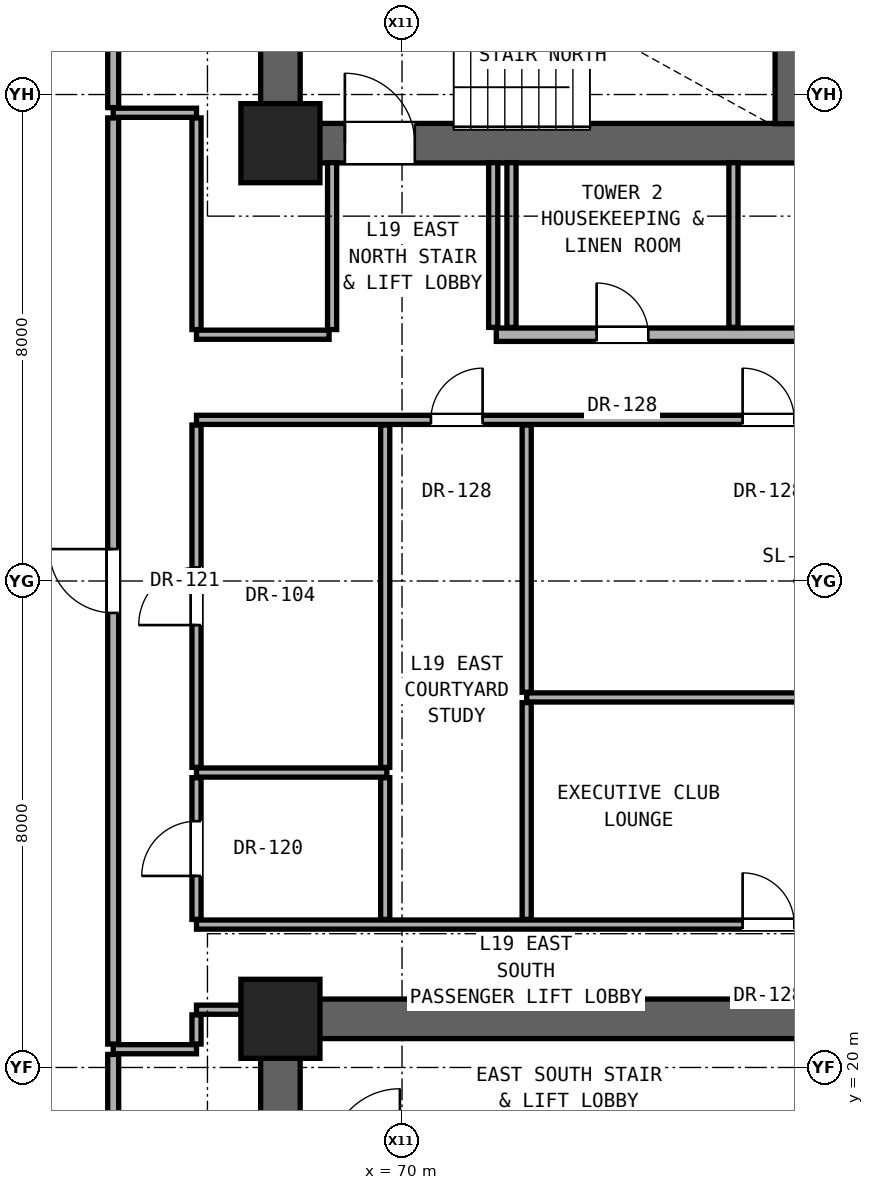
"""IFC4 building model, lengths in metres.
Left out: names, types, materials, properties, quantities, classifications, styles, units other than length and angle.
Written with IfcOpenShell. Run it as: python <this file> out.ifc"""

import sys

from ifc_helpers import new_model, si_unit, direction, frame, frame_2d, origin, origin_2d, place, context, subcontext, project, spatial, rectangle, extrude, element, fill, save


model = new_model("IFC4")
c1 = context("Model", 3, precision=1e-05, world=origin(), true_north=direction((0.0, 1.0)))
c2 = subcontext(c1, "Body", "Model", "MODEL_VIEW")
j1 = project(units=[si_unit("LENGTHUNIT", "METRE"), si_unit("PLANEANGLEUNIT", "RADIAN")], contexts=[c1])
p1 = place(None, origin())
s1 = spatial("IfcSite", under=j1, at=p1, CompositionType="ELEMENT")
p2 = place(p1, origin())
s2 = spatial("IfcBuilding", under=s1, at=p2, CompositionType="ELEMENT")
p3 = place(p2, frame((0.0, 0.0, 68.6)))
s3 = spatial("IfcBuildingStorey", under=s2, at=p3, CompositionType="ELEMENT", Elevation=68.6)
for number, where, z_axis, x_axis in (
    (1, (68.0, 20.8, 0.0), (0.0, 0.0, 1.0), (1.0, 0.0, 0.0)),
    (2, (68.0, 35.2, 0.0), (0.0, 0.0, 1.0), (1.0, 0.0, 0.0)),
):
    element("IfcColumn", number, at=place(p3, frame(where, z_axis=z_axis, x_axis=x_axis)), inside=s3, PredefinedType="COLUMN", context=c2, shape_type="SweptSolid", body=[
        extrude(rectangle(XDim=1.3, YDim=1.3, at=origin_2d()), origin(), (0.0, 0.0, 1.0), 3.3),
    ])
p4 = place(p3, frame((68.0, 35.2, 0.0), z_axis=(0.0, 0.0, 1.0), x_axis=(0.0, 1.0, 0.0)))
e3 = element("IfcWall", 3, at=p4, inside=s3, PredefinedType="SHEAR", context=c2, shape_type="SweptSolid", body=[
    extrude(rectangle(XDim=5.6, YDim=0.65, at=frame_2d((2.8, 0.0))), origin(), (0.0, 0.0, 1.0), 3.06),
])
p5 = place(p3, frame((68.0, 35.2, 0.0), z_axis=(0.0, 0.0, 1.0), x_axis=(1.0, 0.0, 0.0)))
e4 = element("IfcWall", 4, at=p5, inside=s3, PredefinedType="SHEAR", context=c2, shape_type="SweptSolid", body=[
    extrude(rectangle(XDim=17.0, YDim=0.65, at=frame_2d((8.5, 0.0))), origin(), (0.0, 0.0, 1.0), 3.06),
])
p6 = place(p5, frame((1.06, 0.0, 0.0)))
e5 = element("IfcOpeningElement", 5, at=p6, cuts=e4, PredefinedType="OPENING", context=c2, shape_type="SweptSolid", body=[
    extrude(rectangle(XDim=1.15, YDim=2.2, at=frame_2d((0.575, 1.1))), frame((0.0, 0.335, 0.0), z_axis=(0.0, -1.0, 0.0), x_axis=(1.0, 0.0, 0.0)), (0.0, 0.0, 1.0), 0.67),
])
p7 = place(p5, frame((8.75, 0.0, 0.0)))
e6 = element("IfcOpeningElement", 6, at=p7, cuts=e4, PredefinedType="OPENING", context=c2, shape_type="SweptSolid", body=[
    extrude(rectangle(XDim=1.4, YDim=2.35, at=frame_2d((0.7, 1.175))), frame((0.0, 0.335, 0.0), z_axis=(0.0, -1.0, 0.0), x_axis=(1.0, 0.0, 0.0)), (0.0, 0.0, 1.0), 0.67),
])
p8 = place(p5, frame((10.77, 0.0, 0.0)))
e7 = element("IfcOpeningElement", 7, at=p8, cuts=e4, PredefinedType="OPENING", context=c2, shape_type="SweptSolid", body=[
    extrude(rectangle(XDim=1.3, YDim=2.3, at=frame_2d((0.65, 1.15))), frame((0.0, 0.335, 0.0), z_axis=(0.0, -1.0, 0.0), x_axis=(1.0, 0.0, 0.0)), (0.0, 0.0, 1.0), 0.67),
])
p9 = place(p5, frame((12.69, 0.0, 0.0)))
e8 = element("IfcOpeningElement", 8, at=p9, cuts=e4, PredefinedType="OPENING", context=c2, shape_type="SweptSolid", body=[
    extrude(rectangle(XDim=1.3, YDim=2.3, at=frame_2d((0.65, 1.15))), frame((0.0, 0.335, 0.0), z_axis=(0.0, -1.0, 0.0), x_axis=(1.0, 0.0, 0.0)), (0.0, 0.0, 1.0), 0.67),
])
p10 = place(p5, frame((14.57, 0.0, 0.0)))
e9 = element("IfcOpeningElement", 9, at=p10, cuts=e4, PredefinedType="OPENING", context=c2, shape_type="SweptSolid", body=[
    extrude(rectangle(XDim=1.3, YDim=2.3, at=frame_2d((0.65, 1.15))), frame((0.0, 0.335, 0.0), z_axis=(0.0, -1.0, 0.0), x_axis=(1.0, 0.0, 0.0)), (0.0, 0.0, 1.0), 0.67),
])
p11 = place(p3, frame((68.0, 15.2, 0.0), z_axis=(0.0, 0.0, 1.0), x_axis=(0.0, 1.0, 0.0)))
e10 = element("IfcWall", 10, at=p11, inside=s3, PredefinedType="SHEAR", context=c2, shape_type="SweptSolid", body=[
    extrude(rectangle(XDim=5.6, YDim=0.65, at=frame_2d((2.8, 0.0))), origin(), (0.0, 0.0, 1.0), 3.06),
])
p12 = place(p3, frame((68.0, 20.8, 0.0), z_axis=(0.0, 0.0, 1.0), x_axis=(1.0, 0.0, 0.0)))
e11 = element("IfcWall", 11, at=p12, inside=s3, PredefinedType="SHEAR", context=c2, shape_type="SweptSolid", body=[
    extrude(rectangle(XDim=17.0, YDim=0.65, at=frame_2d((8.5, 0.0))), origin(), (0.0, 0.0, 1.0), 3.06),
])
p13 = place(p12, frame((9.55, 0.0, 0.0)))
e12 = element("IfcOpeningElement", 12, at=p13, cuts=e11, PredefinedType="OPENING", context=c2, shape_type="SweptSolid", body=[
    extrude(rectangle(XDim=1.3, YDim=2.3, at=frame_2d((0.65, 1.15))), frame((0.0, 0.335, 0.0), z_axis=(0.0, -1.0, 0.0), x_axis=(1.0, 0.0, 0.0)), (0.0, 0.0, 1.0), 0.67),
])
p14 = place(p12, frame((12.05, 0.0, 0.0)))
e13 = element("IfcOpeningElement", 13, at=p14, cuts=e11, PredefinedType="OPENING", context=c2, shape_type="SweptSolid", body=[
    extrude(rectangle(XDim=1.3, YDim=2.3, at=frame_2d((0.65, 1.15))), frame((0.0, 0.335, 0.0), z_axis=(0.0, -1.0, 0.0), x_axis=(1.0, 0.0, 0.0)), (0.0, 0.0, 1.0), 0.67),
])
p15 = place(p3, frame((65.25, 20.3, 0.0), z_axis=(0.0, 0.0, 1.0), x_axis=(1.0, 0.0, 0.0)))
e14 = element("IfcWall", 14, at=p15, inside=s3, PredefinedType="PARTITIONING", context=c2, shape_type="SweptSolid", body=[
    extrude(rectangle(XDim=1.37, YDim=0.15, at=frame_2d((0.685, 0.0))), origin(), (0.0, 0.0, 1.0), 3.06),
])
p16 = place(p3, frame((66.62, 20.95, 0.0), z_axis=(0.0, 0.0, 1.0), x_axis=(1.0, 0.0, 0.0)))
e15 = element("IfcWall", 15, at=p16, inside=s3, PredefinedType="PARTITIONING", context=c2, shape_type="SweptSolid", body=[
    extrude(rectangle(XDim=1.06, YDim=0.15, at=frame_2d((0.53, 0.0))), origin(), (0.0, 0.0, 1.0), 2.452),
])
p17 = place(p3, frame((66.62, 22.35, 0.0), z_axis=(0.0, 0.0, 1.0), x_axis=(1.0, 0.0, 0.0)))
e16 = element("IfcWall", 16, at=p17, inside=s3, PredefinedType="PARTITIONING", context=c2, shape_type="SweptSolid", body=[
    extrude(rectangle(XDim=19.63, YDim=0.15, at=frame_2d((9.815, 0.0))), origin(), (0.0, 0.0, 1.0), 2.125),
])
p18 = place(p17, frame((8.981, 0.0, 0.0)))
e17 = element("IfcOpeningElement", 17, at=p18, cuts=e16, PredefinedType="OPENING", context=c2, shape_type="SweptSolid", body=[
    extrude(rectangle(XDim=0.85, YDim=2.01, at=frame_2d((0.425, 1.005))), frame((0.0, 0.085, 0.0), z_axis=(0.0, -1.0, 0.0), x_axis=(1.0, 0.0, 0.0)), (0.0, 0.0, 1.0), 0.17),
])
p19 = place(p17, frame((16.061, 0.0, 0.0)))
e18 = element("IfcOpeningElement", 18, at=p19, cuts=e16, PredefinedType="OPENING", context=c2, shape_type="SweptSolid", body=[
    extrude(rectangle(XDim=0.85, YDim=2.01, at=frame_2d((0.425, 1.005))), frame((0.0, 0.085, 0.0), z_axis=(0.0, -1.0, 0.0), x_axis=(1.0, 0.0, 0.0)), (0.0, 0.0, 1.0), 0.17),
])
p20 = place(p3, frame((66.62, 24.85, 0.0), z_axis=(0.0, 0.0, 1.0), x_axis=(1.0, 0.0, 0.0)))
e19 = element("IfcWall", 19, at=p20, inside=s3, PredefinedType="PARTITIONING", context=c2, shape_type="SweptSolid", body=[
    extrude(rectangle(XDim=3.13, YDim=0.15, at=frame_2d((1.565, 0.0))), origin(), (0.0, 0.0, 1.0), 2.125),
])
p21 = place(p3, frame((72.05, 26.085, 0.0), z_axis=(0.0, 0.0, 1.0), x_axis=(1.0, 0.0, 0.0)))
e20 = element("IfcWall", 20, at=p21, inside=s3, PredefinedType="PARTITIONING", context=c2, shape_type="SweptSolid", body=[
    extrude(rectangle(XDim=14.2, YDim=0.15, at=frame_2d((7.1, 0.0))), origin(), (0.0, 0.0, 1.0), 2.125),
])
p22 = place(p3, frame((66.62, 30.65, 0.0), z_axis=(0.0, 0.0, 1.0), x_axis=(1.0, 0.0, 0.0)))
e21 = element("IfcWall", 21, at=p22, inside=s3, PredefinedType="PARTITIONING", context=c2, shape_type="SweptSolid", body=[
    extrude(rectangle(XDim=19.63, YDim=0.15, at=frame_2d((9.815, 0.0))), origin(), (0.0, 0.0, 1.0), 2.125),
])
p23 = place(p22, frame((3.855, 0.0, 0.0)))
e22 = element("IfcOpeningElement", 22, at=p23, cuts=e21, PredefinedType="OPENING", context=c2, shape_type="SweptSolid", body=[
    extrude(rectangle(XDim=0.85, YDim=2.01, at=frame_2d((0.425, 1.005))), frame((0.0, 0.085, 0.0), z_axis=(0.0, -1.0, 0.0), x_axis=(1.0, 0.0, 0.0)), (0.0, 0.0, 1.0), 0.17),
])
p24 = place(p22, frame((8.981, 0.0, 0.0)))
e23 = element("IfcOpeningElement", 23, at=p24, cuts=e21, PredefinedType="OPENING", context=c2, shape_type="SweptSolid", body=[
    extrude(rectangle(XDim=0.85, YDim=2.01, at=frame_2d((0.425, 1.005))), frame((0.0, 0.085, 0.0), z_axis=(0.0, -1.0, 0.0), x_axis=(1.0, 0.0, 0.0)), (0.0, 0.0, 1.0), 0.17),
])
p25 = place(p22, frame((16.061, 0.0, 0.0)))
e24 = element("IfcOpeningElement", 24, at=p25, cuts=e21, PredefinedType="OPENING", context=c2, shape_type="SweptSolid", body=[
    extrude(rectangle(XDim=0.85, YDim=2.01, at=frame_2d((0.425, 1.005))), frame((0.0, 0.085, 0.0), z_axis=(0.0, -1.0, 0.0), x_axis=(1.0, 0.0, 0.0)), (0.0, 0.0, 1.0), 0.17),
])
p26 = place(p3, frame((66.62, 32.05, 0.0), z_axis=(0.0, 0.0, 1.0), x_axis=(1.0, 0.0, 0.0)))
e25 = element("IfcWall", 25, at=p26, inside=s3, PredefinedType="PARTITIONING", context=c2, shape_type="SweptSolid", body=[
    extrude(rectangle(XDim=2.18, YDim=0.15, at=frame_2d((1.09, 0.0))), origin(), (0.0, 0.0, 1.0), 2.125),
])
p27 = place(p3, frame((71.55, 32.05, 0.0), z_axis=(0.0, 0.0, 1.0), x_axis=(1.0, 0.0, 0.0)))
e26 = element("IfcWall", 26, at=p27, inside=s3, PredefinedType="SOLIDWALL", context=c2, shape_type="SweptSolid", body=[
    extrude(rectangle(XDim=14.7, YDim=0.22, at=frame_2d((7.35, 0.0))), origin(), (0.0, 0.0, 1.0), 2.125),
])
p28 = place(p27, frame((11.39, 0.0, 0.0)))
e27 = element("IfcOpeningElement", 27, at=p28, cuts=e26, PredefinedType="OPENING", context=c2, shape_type="SweptSolid", body=[
    extrude(rectangle(XDim=0.85, YDim=2.01, at=frame_2d((0.425, 1.005))), frame((0.0, 0.12, 0.0), z_axis=(0.0, -1.0, 0.0), x_axis=(1.0, 0.0, 0.0)), (0.0, 0.0, 1.0), 0.24),
])
p29 = place(p27, frame((6.065, 0.0, 0.0)))
e28 = element("IfcOpeningElement", 28, at=p29, cuts=e26, PredefinedType="OPENING", context=c2, shape_type="SweptSolid", body=[
    extrude(rectangle(XDim=0.85, YDim=2.01, at=frame_2d((0.425, 1.005))), frame((0.0, 0.12, 0.0), z_axis=(0.0, -1.0, 0.0), x_axis=(1.0, 0.0, 0.0)), (0.0, 0.0, 1.0), 0.24),
])
p30 = place(p27, frame((1.65, 0.0, 0.0)))
e29 = element("IfcOpeningElement", 29, at=p30, cuts=e26, PredefinedType="OPENING", context=c2, shape_type="SweptSolid", body=[
    extrude(rectangle(XDim=0.85, YDim=2.01, at=frame_2d((0.425, 1.005))), frame((0.0, 0.12, 0.0), z_axis=(0.0, -1.0, 0.0), x_axis=(1.0, 0.0, 0.0)), (0.0, 0.0, 1.0), 0.24),
])
p31 = place(p3, frame((65.25, 35.7, 0.0), z_axis=(0.0, 0.0, 1.0), x_axis=(1.0, 0.0, 0.0)))
e30 = element("IfcWall", 30, at=p31, inside=s3, PredefinedType="PARTITIONING", context=c2, shape_type="SweptSolid", body=[
    extrude(rectangle(XDim=1.37, YDim=0.15, at=frame_2d((0.685, 0.0))), origin(), (0.0, 0.0, 1.0), 3.06),
])
p32 = place(p3, frame((65.25, 16.454, 0.0), z_axis=(0.0, 0.0, 1.0), x_axis=(0.0, 1.0, 0.0)))
e31 = element("IfcWall", 31, at=p32, inside=s3, PredefinedType="PARTITIONING", context=c2, shape_type="SweptSolid", body=[
    extrude(rectangle(XDim=3.761, YDim=0.18, at=frame_2d((1.88, 0.0))), origin(), (0.0, 0.0, 1.0), 2.436),
])
p33 = place(p3, frame((65.25, 20.385, 0.0), z_axis=(0.0, 0.0, 1.0), x_axis=(0.0, 1.0, 0.0)))
e32 = element("IfcWall", 32, at=p33, inside=s3, PredefinedType="PARTITIONING", context=c2, shape_type="SweptSolid", body=[
    extrude(rectangle(XDim=15.23, YDim=0.18, at=frame_2d((7.615, 0.0))), origin(), (0.0, 0.0, 1.0), 2.279),
])
p34 = place(p33, frame((7.09, 0.0, 0.0)))
e33 = element("IfcOpeningElement", 33, at=p34, cuts=e32, PredefinedType="OPENING", context=c2, shape_type="SweptSolid", body=[
    extrude(rectangle(XDim=1.05, YDim=2.2, at=frame_2d((0.525, 1.1))), frame((0.0, 0.1, 0.0), z_axis=(0.0, -1.0, 0.0), x_axis=(1.0, 0.0, 0.0)), (0.0, 0.0, 1.0), 0.2),
])
p35 = place(p3, frame((65.25, 35.785, 0.0), z_axis=(0.0, 0.0, 1.0), x_axis=(0.0, 1.0, 0.0)))
e34 = element("IfcWall", 34, at=p35, inside=s3, PredefinedType="PARTITIONING", context=c2, shape_type="SweptSolid", body=[
    extrude(rectangle(XDim=1.042, YDim=0.18, at=frame_2d((0.521, 0.0))), origin(), (0.0, 0.0, 1.0), 3.06),
])
p36 = place(p3, frame((66.62, 20.385, 0.0), z_axis=(0.0, 0.0, 1.0), x_axis=(0.0, 1.0, 0.0)))
e35 = element("IfcWall", 35, at=p36, inside=s3, PredefinedType="PARTITIONING", context=c2, shape_type="SweptSolid", body=[
    extrude(rectangle(XDim=0.48, YDim=0.15, at=frame_2d((0.24, 0.0))), origin(), (0.0, 0.0, 1.0), 2.452),
])
p37 = place(p3, frame((66.62, 22.435, 0.0), z_axis=(0.0, 0.0, 1.0), x_axis=(0.0, 1.0, 0.0)))
e36 = element("IfcWall", 36, at=p37, inside=s3, PredefinedType="PARTITIONING", context=c2, shape_type="SweptSolid", body=[
    extrude(rectangle(XDim=2.33, YDim=0.15, at=frame_2d((1.165, 0.0))), origin(), (0.0, 0.0, 1.0), 3.06),
])
p38 = place(p37, frame((0.715, 0.0, 0.0)))
e37 = element("IfcOpeningElement", 37, at=p38, cuts=e36, PredefinedType="OPENING", context=c2, shape_type="SweptSolid", body=[
    extrude(rectangle(XDim=0.9, YDim=2.1, at=frame_2d((0.45, 1.05))), frame((0.0, 0.085, 0.0), z_axis=(0.0, -1.0, 0.0), x_axis=(1.0, 0.0, 0.0)), (0.0, 0.0, 1.0), 0.17),
])
p39 = place(p3, frame((66.62, 24.935, 0.0), z_axis=(0.0, 0.0, 1.0), x_axis=(0.0, 1.0, 0.0)))
e38 = element("IfcWall", 38, at=p39, inside=s3, PredefinedType="PARTITIONING", context=c2, shape_type="SweptSolid", body=[
    extrude(rectangle(XDim=5.63, YDim=0.15, at=frame_2d((2.815, 0.0))), origin(), (0.0, 0.0, 1.0), 2.279),
])
p40 = place(p39, frame((2.34, 0.0, 0.0)))
e39 = element("IfcOpeningElement", 39, at=p40, cuts=e38, PredefinedType="OPENING", context=c2, shape_type="SweptSolid", body=[
    extrude(rectangle(XDim=0.95, YDim=2.15, at=frame_2d((0.475, 1.075))), frame((0.0, 0.085, 0.0), z_axis=(0.0, -1.0, 0.0), x_axis=(1.0, 0.0, 0.0)), (0.0, 0.0, 1.0), 0.17),
])
p41 = place(p3, frame((66.62, 32.135, 0.0), z_axis=(0.0, 0.0, 1.0), x_axis=(0.0, 1.0, 0.0)))
e40 = element("IfcWall", 40, at=p41, inside=s3, PredefinedType="PARTITIONING", context=c2, shape_type="SweptSolid", body=[
    extrude(rectangle(XDim=3.48, YDim=0.15, at=frame_2d((1.74, 0.0))), origin(), (0.0, 0.0, 1.0), 2.452),
])
p42 = place(p3, frame((68.85, 32.135, 0.0), z_axis=(0.0, 0.0, 1.0), x_axis=(0.0, 1.0, 0.0)))
e41 = element("IfcWall", 41, at=p42, inside=s3, PredefinedType="PARTITIONING", context=c2, shape_type="SweptSolid", body=[
    extrude(rectangle(XDim=2.745, YDim=0.15, at=frame_2d((1.373, 0.0))), origin(), (0.0, 0.0, 1.0), 3.06),
])
p43 = place(p3, frame((69.723, 22.435, 0.0), z_axis=(0.0, 0.0, 1.0), x_axis=(0.0, 1.0, 0.0)))
e42 = element("IfcWall", 42, at=p43, inside=s3, PredefinedType="PARTITIONING", context=c2, shape_type="SweptSolid", body=[
    extrude(rectangle(XDim=2.33, YDim=0.15, at=frame_2d((1.165, 0.0))), origin(), (0.0, 0.0, 1.0), 3.06),
])
p44 = place(p3, frame((69.723, 24.935, 0.0), z_axis=(0.0, 0.0, 1.0), x_axis=(0.0, 1.0, 0.0)))
e43 = element("IfcWall", 43, at=p44, inside=s3, PredefinedType="PARTITIONING", context=c2, shape_type="SweptSolid", body=[
    extrude(rectangle(XDim=5.63, YDim=0.15, at=frame_2d((2.815, 0.0))), origin(), (0.0, 0.0, 1.0), 2.125),
])
for number, where, z_axis, x_axis in (
    (44, (71.5, 32.17, 0.0), (0.0, 0.0, 1.0), (0.0, 1.0, 0.0)),
    (45, (71.8, 32.17, 0.0), (0.0, 0.0, 1.0), (0.0, 1.0, 0.0)),
):
    element("IfcWall", number, at=place(p3, frame(where, z_axis=z_axis, x_axis=x_axis)), inside=s3, PredefinedType="PARTITIONING", context=c2, shape_type="SweptSolid", body=[
        extrude(rectangle(XDim=2.71, YDim=0.15, at=frame_2d((1.355, 0.0))), origin(), (0.0, 0.0, 1.0), 3.06),
    ])
p45 = place(p3, frame((72.05, 22.435, 0.0), z_axis=(0.0, 0.0, 1.0), x_axis=(0.0, 1.0, 0.0)))
e46 = element("IfcWall", 46, at=p45, inside=s3, PredefinedType="PARTITIONING", context=c2, shape_type="SweptSolid", body=[
    extrude(rectangle(XDim=3.565, YDim=0.15, at=frame_2d((1.782, 0.0))), origin(), (0.0, 0.0, 1.0), 2.589),
])
p46 = place(p3, frame((72.05, 26.17, 0.0), z_axis=(0.0, 0.0, 1.0), x_axis=(0.0, 1.0, 0.0)))
e47 = element("IfcWall", 47, at=p46, inside=s3, PredefinedType="PARTITIONING", context=c2, shape_type="SweptSolid", body=[
    extrude(rectangle(XDim=4.395, YDim=0.15, at=frame_2d((2.198, 0.0))), origin(), (0.0, 0.0, 1.0), 2.125),
])
p47 = place(p3, frame((75.45, 32.17, 0.0), z_axis=(0.0, 0.0, 1.0), x_axis=(0.0, 1.0, 0.0)))
e48 = element("IfcWall", 48, at=p47, inside=s3, PredefinedType="PARTITIONING", context=c2, shape_type="SweptSolid", body=[
    extrude(rectangle(XDim=2.71, YDim=0.15, at=frame_2d((1.355, 0.0))), origin(), (0.0, 0.0, 1.0), 3.06),
])
p48 = place(p3, frame((76.36, 35.52, 0.0), z_axis=(0.0, 0.0, 1.0), x_axis=(0.0, 1.0, 0.0)))
e49 = element("IfcWall", 49, at=p48, inside=s3, PredefinedType="SHEAR", context=c2, shape_type="SweptSolid", body=[
    extrude(rectangle(XDim=2.745, YDim=0.45, at=frame_2d((1.373, 0.0))), origin(), (0.0, 0.0, 1.0), 3.06),
])
p49 = place(p6, origin())
e50 = element("IfcDoor", 50, at=p49, inside=s3, OperationType="SINGLE_SWING_LEFT", PredefinedType="DOOR", context=c2, shape_type="SweptSolid", body=[
    extrude(rectangle(XDim=1.15, YDim=2.2, at=frame_2d((0.575, 1.1))), frame((0.0, 0.025, 0.0), z_axis=(0.0, -1.0, 0.0), x_axis=(1.0, 0.0, 0.0)), (0.0, 0.0, 1.0), 0.05),
])
fill(e5, e50)
p50 = place(p30, origin())
e51 = element("IfcDoor", 51, at=p50, inside=s3, OperationType="SINGLE_SWING_LEFT", PredefinedType="DOOR", context=c2, shape_type="SweptSolid", body=[
    extrude(rectangle(XDim=0.85, YDim=2.01, at=frame_2d((0.425, 1.005))), frame((0.0, 0.025, 0.0), z_axis=(0.0, -1.0, 0.0), x_axis=(1.0, 0.0, 0.0)), (0.0, 0.0, 1.0), 0.05),
])
fill(e29, e51)
p51 = place(p38, origin())
e52 = element("IfcDoor", 52, at=p51, inside=s3, OperationType="SINGLE_SWING_LEFT", PredefinedType="DOOR", context=c2, shape_type="SweptSolid", body=[
    extrude(rectangle(XDim=0.9, YDim=2.1, at=frame_2d((0.45, 1.05))), frame((0.0, 0.025, 0.0), z_axis=(0.0, -1.0, 0.0), x_axis=(1.0, 0.0, 0.0)), (0.0, 0.0, 1.0), 0.05),
])
fill(e37, e52)
p52 = place(p34, origin())
e53 = element("IfcDoor", 53, at=p52, inside=s3, OperationType="SINGLE_SWING_RIGHT", PredefinedType="DOOR", context=c2, shape_type="SweptSolid", body=[
    extrude(rectangle(XDim=1.05, YDim=2.2, at=frame_2d((0.525, 1.1))), frame((0.0, 0.025, 0.0), z_axis=(0.0, -1.0, 0.0), x_axis=(1.0, 0.0, 0.0)), (0.0, 0.0, 1.0), 0.05),
])
fill(e33, e53)
p53 = place(p40, origin())
e54 = element("IfcDoor", 54, at=p53, inside=s3, OperationType="SINGLE_SWING_LEFT", PredefinedType="DOOR", context=c2, shape_type="SweptSolid", body=[
    extrude(rectangle(XDim=0.95, YDim=2.15, at=frame_2d((0.475, 1.075))), frame((0.0, 0.025, 0.0), z_axis=(0.0, -1.0, 0.0), x_axis=(1.0, 0.0, 0.0)), (0.0, 0.0, 1.0), 0.05),
])
fill(e39, e54)
p54 = place(p23, origin())
e55 = element("IfcDoor", 55, at=p54, inside=s3, OperationType="SINGLE_SWING_RIGHT", PredefinedType="DOOR", context=c2, shape_type="SweptSolid", body=[
    extrude(rectangle(XDim=0.85, YDim=2.01, at=frame_2d((0.425, 1.005))), frame((0.0, 0.025, 0.0), z_axis=(0.0, -1.0, 0.0), x_axis=(1.0, 0.0, 0.0)), (0.0, 0.0, 1.0), 0.05),
])
fill(e22, e55)
p55 = place(p18, origin())
e56 = element("IfcDoor", 56, at=p55, inside=s3, OperationType="SINGLE_SWING_LEFT", PredefinedType="DOOR", context=c2, shape_type="SweptSolid", body=[
    extrude(rectangle(XDim=0.85, YDim=2.01, at=frame_2d((0.425, 1.005))), frame((0.0, 0.025, 0.0), z_axis=(0.0, -1.0, 0.0), x_axis=(1.0, 0.0, 0.0)), (0.0, 0.0, 1.0), 0.05),
])
fill(e17, e56)
p56 = place(p24, origin())
e57 = element("IfcDoor", 57, at=p56, inside=s3, OperationType="SINGLE_SWING_LEFT", PredefinedType="DOOR", context=c2, shape_type="SweptSolid", body=[
    extrude(rectangle(XDim=0.85, YDim=2.01, at=frame_2d((0.425, 1.005))), frame((0.0, 0.025, 0.0), z_axis=(0.0, -1.0, 0.0), x_axis=(1.0, 0.0, 0.0)), (0.0, 0.0, 1.0), 0.05),
])
fill(e23, e57)
save(model, sys.argv[1])
